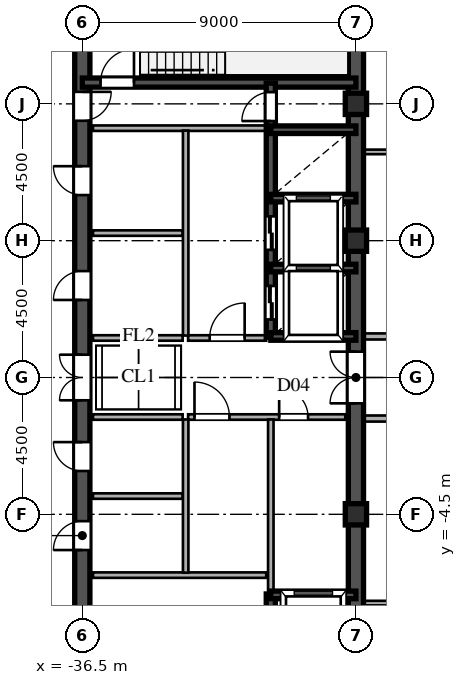
"""IFC4 building model, lengths in metres.
Left out: names, types, materials, properties, quantities, classifications, styles, units other than length and angle.
Written with IfcOpenShell. Run it as: python <this file> out.ifc"""

import sys

from ifc_helpers import new_model, si_unit, direction, frame, frame_2d, origin, origin_2d, place, context, subcontext, project, spatial, rectangle, hollow_rectangle, extrude, source, transform, mapped, element, fill, save


model = new_model("IFC4")
c1 = context("Model", 3, precision=1e-05, world=origin(), true_north=direction((0.0, 1.0)))
c2 = subcontext(c1, "Body", "Model", "MODEL_VIEW")
j1 = project(units=[si_unit("LENGTHUNIT", "METRE"), si_unit("PLANEANGLEUNIT", "RADIAN")], contexts=[c1])
p1 = place(None, origin())
s1 = spatial("IfcSite", under=j1, at=p1, CompositionType="ELEMENT")
p2 = place(p1, origin())
s2 = spatial("IfcBuilding", under=s1, at=p2, CompositionType="ELEMENT")
p3 = place(p2, frame((0.0, 0.0, 254.4)))
s3 = spatial("IfcBuildingStorey", under=s2, at=p3, CompositionType="ELEMENT", Elevation=254.4)
m1 = source(origin(), c2, "Body", "SweptSolid", [
    extrude(hollow_rectangle(XDim=0.7, YDim=0.7, WallThickness=0.03, at=origin_2d()), origin(), (0.0, 0.0, 1.0), 3.75),
])
for number, where, z_axis, x_axis in (
    (1, (-27.5, -4.5, 0.0), (0.0, 0.0, 1.0), (1.0, 0.0, 0.0)),
    (2, (-27.5, 4.5, 0.0), (0.0, 0.0, 1.0), (1.0, 0.0, 0.0)),
    (3, (-27.5, 9.0, 0.0), (0.0, 0.0, 1.0), (1.0, 0.0, 0.0)),
):
    element("IfcColumn", number, at=place(p3, frame(where, z_axis=z_axis, x_axis=x_axis)), inside=s3, PredefinedType="COLUMN", context=c2, shape_type="MappedRepresentation", body=[
        mapped(m1, transform((0.0, 0.0, 0.0), scale=1.0)),
    ])
for number, where, z_axis, x_axis in (
    (4, (-27.5, -13.5, 0.0), (0.0, 0.0, 1.0), (0.0, 1.0, 0.0)),
    (5, (-27.5, 1.3, 0.0), (0.0, 0.0, 1.0), (0.0, 1.0, 0.0)),
):
    element("IfcWall", number, at=place(p3, frame(where, z_axis=z_axis, x_axis=x_axis)), inside=s3, PredefinedType="SHEAR", context=c2, shape_type="SweptSolid", body=[
        extrude(rectangle(XDim=12.2, YDim=0.5, at=frame_2d((6.1, 0.0))), origin(), (0.0, 0.0, 1.0), 3.53),
    ])
p4 = place(p3, frame((-27.5, -1.3, 0.0), z_axis=(0.0, 0.0, 1.0), x_axis=(0.0, 1.0, 0.0)))
e6 = element("IfcWall", 6, at=p4, inside=s3, PredefinedType="SHEAR", context=c2, shape_type="SweptSolid", body=[
    extrude(rectangle(XDim=2.6, YDim=0.5, at=frame_2d((1.3, 0.0))), origin(), (0.0, 0.0, 1.0), 3.53),
])
p5 = place(p4, frame((0.45, 0.0, 0.0)))
e7 = element("IfcOpeningElement", 7, at=p5, cuts=e6, PredefinedType="OPENING", context=c2, shape_type="SweptSolid", body=[
    extrude(rectangle(XDim=1.7, YDim=2.35, at=frame_2d((0.85, 1.175))), frame((0.0, 0.26, 0.0), z_axis=(0.0, -1.0, 0.0), x_axis=(1.0, 0.0, 0.0)), (0.0, 0.0, 1.0), 0.52),
])
p6 = place(p3, frame((-36.5, -13.65, 0.0), z_axis=(0.0, 0.0, 1.0), x_axis=(0.0, 1.0, 0.0)))
e8 = element("IfcWall", 8, at=p6, inside=s3, PredefinedType="SHEAR", context=c2, shape_type="SweptSolid", body=[
    extrude(rectangle(XDim=7.15, YDim=0.5, at=frame_2d((3.575, 0.0))), origin(), (0.0, 0.0, 1.0), 3.53),
])
p7 = place(p6, frame((4.675, 0.0, 0.0)))
e9 = element("IfcOpeningElement", 9, at=p7, cuts=e8, PredefinedType="OPENING", context=c2, shape_type="SweptSolid", body=[
    extrude(rectangle(XDim=1.15, YDim=2.2, at=frame_2d((0.575, 1.1))), frame((0.0, 0.26, 0.0), z_axis=(0.0, -1.0, 0.0), x_axis=(1.0, 0.0, 0.0)), (0.0, 0.0, 1.0), 0.52),
])
p8 = place(p3, frame((-36.5, -1.3, 0.0), z_axis=(0.0, 0.0, 1.0), x_axis=(0.0, 1.0, 0.0)))
e10 = element("IfcWall", 10, at=p8, inside=s3, PredefinedType="SHEAR", context=c2, shape_type="SweptSolid", body=[
    extrude(rectangle(XDim=2.6, YDim=0.5, at=frame_2d((1.3, 0.0))), origin(), (0.0, 0.0, 1.0), 3.53),
])
p9 = place(p8, frame((0.55, 0.0, 0.0)))
e11 = element("IfcOpeningElement", 11, at=p9, cuts=e10, PredefinedType="OPENING", context=c2, shape_type="SweptSolid", body=[
    extrude(rectangle(XDim=1.5, YDim=2.3, at=frame_2d((0.75, 1.15))), frame((0.0, 0.26, 0.0), z_axis=(0.0, -1.0, 0.0), x_axis=(1.0, 0.0, 0.0)), (0.0, 0.0, 1.0), 0.52),
])
p10 = place(p3, frame((-36.5, 8.2, 0.0), z_axis=(0.0, 0.0, 1.0), x_axis=(0.0, 1.0, 0.0)))
e12 = element("IfcWall", 12, at=p10, inside=s3, PredefinedType="SHEAR", context=c2, shape_type="SweptSolid", body=[
    extrude(rectangle(XDim=5.45, YDim=0.5, at=frame_2d((2.725, 0.0))), origin(), (0.0, 0.0, 1.0), 3.53),
])
p11 = place(p10, frame((0.245, 0.0, 0.0)))
e13 = element("IfcOpeningElement", 13, at=p11, cuts=e12, PredefinedType="OPENING", context=c2, shape_type="SweptSolid", body=[
    extrude(rectangle(XDim=0.95, YDim=2.15, at=frame_2d((0.475, 1.075))), frame((0.0, 0.26, 0.0), z_axis=(0.0, -1.0, 0.0), x_axis=(1.0, 0.0, 0.0)), (0.0, 0.0, 1.0), 0.52),
])
p12 = place(p3, frame((-36.5, -6.5, 0.0), z_axis=(0.0, 0.0, 1.0), x_axis=(0.0, 1.0, 0.0)))
e14 = element("IfcWall", 14, at=p12, inside=s3, PredefinedType="SHEAR", context=c2, shape_type="SweptSolid", body=[
    extrude(rectangle(XDim=2.6, YDim=0.5, at=frame_2d((1.3, 0.0))), origin(), (0.0, 0.0, 1.0), 3.53),
])
p13 = place(p12, frame((0.825, 0.0, 0.0)))
e15 = element("IfcOpeningElement", 15, at=p13, cuts=e14, PredefinedType="OPENING", context=c2, shape_type="SweptSolid", body=[
    extrude(rectangle(XDim=0.95, YDim=2.15, at=frame_2d((0.475, 1.075))), frame((0.0, 0.26, 0.0), z_axis=(0.0, -1.0, 0.0), x_axis=(1.0, 0.0, 0.0)), (0.0, 0.0, 1.0), 0.52),
])
p14 = place(p3, frame((-36.5, -3.9, 0.0), z_axis=(0.0, 0.0, 1.0), x_axis=(0.0, 1.0, 0.0)))
e16 = element("IfcWall", 16, at=p14, inside=s3, PredefinedType="SHEAR", context=c2, shape_type="SweptSolid", body=[
    extrude(rectangle(XDim=2.6, YDim=0.5, at=frame_2d((1.3, 0.0))), origin(), (0.0, 0.0, 1.0), 3.53),
])
p15 = place(p14, frame((0.825, 0.0, 0.0)))
e17 = element("IfcOpeningElement", 17, at=p15, cuts=e16, PredefinedType="OPENING", context=c2, shape_type="SweptSolid", body=[
    extrude(rectangle(XDim=0.95, YDim=2.15, at=frame_2d((0.475, 1.075))), frame((0.0, 0.26, 0.0), z_axis=(0.0, -1.0, 0.0), x_axis=(1.0, 0.0, 0.0)), (0.0, 0.0, 1.0), 0.52),
])
p16 = place(p3, frame((-36.5, 1.3, 0.0), z_axis=(0.0, 0.0, 1.0), x_axis=(0.0, 1.0, 0.0)))
e18 = element("IfcWall", 18, at=p16, inside=s3, PredefinedType="SHEAR", context=c2, shape_type="SweptSolid", body=[
    extrude(rectangle(XDim=3.45, YDim=0.5, at=frame_2d((1.725, 0.0))), origin(), (0.0, 0.0, 1.0), 3.53),
])
p17 = place(p16, frame((1.25, 0.0, 0.0)))
e19 = element("IfcOpeningElement", 19, at=p17, cuts=e18, PredefinedType="OPENING", context=c2, shape_type="SweptSolid", body=[
    extrude(rectangle(XDim=0.95, YDim=2.15, at=frame_2d((0.475, 1.075))), frame((0.0, 0.26, 0.0), z_axis=(0.0, -1.0, 0.0), x_axis=(1.0, 0.0, 0.0)), (0.0, 0.0, 1.0), 0.52),
])
p18 = place(p3, frame((-36.5, 4.75, 0.0), z_axis=(0.0, 0.0, 1.0), x_axis=(0.0, 1.0, 0.0)))
e20 = element("IfcWall", 20, at=p18, inside=s3, PredefinedType="SHEAR", context=c2, shape_type="SweptSolid", body=[
    extrude(rectangle(XDim=3.45, YDim=0.5, at=frame_2d((1.725, 0.0))), origin(), (0.0, 0.0, 1.0), 3.53),
])
p19 = place(p18, frame((1.25, 0.0, 0.0)))
e21 = element("IfcOpeningElement", 21, at=p19, cuts=e20, PredefinedType="OPENING", context=c2, shape_type="SweptSolid", body=[
    extrude(rectangle(XDim=0.95, YDim=2.15, at=frame_2d((0.475, 1.075))), frame((0.0, 0.26, 0.0), z_axis=(0.0, -1.0, 0.0), x_axis=(1.0, 0.0, 0.0)), (0.0, 0.0, 1.0), 0.52),
])
p20 = place(p3, frame((-36.5, 9.7, 0.0), z_axis=(0.0, 0.0, 1.0), x_axis=(1.0, 0.0, 0.0)))
e22 = element("IfcWall", 22, at=p20, inside=s3, PredefinedType="SHEAR", context=c2, shape_type="SweptSolid", body=[
    extrude(rectangle(XDim=9.0, YDim=0.3, at=frame_2d((4.5, 0.0))), origin(), (0.0, 0.0, 1.0), 3.53),
])
p21 = place(p20, frame((0.6, 0.0, 0.0)))
e23 = element("IfcOpeningElement", 23, at=p21, cuts=e22, PredefinedType="OPENING", context=c2, shape_type="SweptSolid", body=[
    extrude(rectangle(XDim=1.1, YDim=2.2, at=frame_2d((0.55, 1.1))), frame((0.0, 0.16, 0.0), z_axis=(0.0, -1.0, 0.0), x_axis=(1.0, 0.0, 0.0)), (0.0, 0.0, 1.0), 0.32),
])
for number, where, z_axis, x_axis in (
    (24, (-30.3, -7.15, 0.0), (0.0, 0.0, 1.0), (1.0, 0.0, 0.0)),
    (25, (-30.3, 1.35, 0.0), (0.0, 0.0, 1.0), (1.0, 0.0, 0.0)),
    (26, (-30.3, 3.6, 0.0), (0.0, 0.0, 1.0), (1.0, 0.0, 0.0)),
    (27, (-30.3, 5.9, 0.0), (0.0, 0.0, 1.0), (1.0, 0.0, 0.0)),
    (28, (-30.3, 8.15, 0.0), (0.0, 0.0, 1.0), (1.0, 0.0, 0.0)),
):
    element("IfcWall", number, at=place(p3, frame(where, z_axis=z_axis, x_axis=x_axis)), inside=s3, PredefinedType="SHEAR", context=c2, shape_type="SweptSolid", body=[
        extrude(rectangle(XDim=2.8, YDim=0.25, at=frame_2d((1.4, 0.0))), origin(), (0.0, 0.0, 1.0), 3.53),
    ])
p22 = place(p3, frame((-30.3, -9.68, 0.0), z_axis=(0.0, 0.0, 1.0), x_axis=(0.0, 1.0, 0.0)))
e29 = element("IfcWall", 29, at=p22, inside=s3, PredefinedType="SHEAR", context=c2, shape_type="SweptSolid", body=[
    extrude(rectangle(XDim=2.56, YDim=0.3, at=frame_2d((1.28, 0.0))), origin(), (0.0, 0.0, 1.0), 3.53),
])
p23 = place(p22, frame((0.68, 0.0, 0.0)))
e30 = element("IfcOpeningElement", 30, at=p23, cuts=e29, PredefinedType="OPENING", context=c2, shape_type="SweptSolid", body=[
    extrude(rectangle(XDim=1.2, YDim=2.25, at=frame_2d((0.6, 1.125))), frame((0.0, 0.16, 0.0), z_axis=(0.0, -1.0, 0.0), x_axis=(1.0, 0.0, 0.0)), (0.0, 0.0, 1.0), 0.32),
])
p24 = place(p3, frame((-30.3, 1.32, 0.0), z_axis=(0.0, 0.0, 1.0), x_axis=(0.0, 1.0, 0.0)))
e31 = element("IfcWall", 31, at=p24, inside=s3, PredefinedType="SHEAR", context=c2, shape_type="SweptSolid", body=[
    extrude(rectangle(XDim=2.28, YDim=0.3, at=frame_2d((1.14, 0.0))), origin(), (0.0, 0.0, 1.0), 3.53),
])
p25 = place(p24, frame((0.59, 0.0, 0.0)))
e32 = element("IfcOpeningElement", 32, at=p25, cuts=e31, PredefinedType="OPENING", context=c2, shape_type="SweptSolid", body=[
    extrude(rectangle(XDim=1.1, YDim=2.2, at=frame_2d((0.55, 1.1))), frame((0.0, 0.16, 0.0), z_axis=(0.0, -1.0, 0.0), x_axis=(1.0, 0.0, 0.0)), (0.0, 0.0, 1.0), 0.32),
])
p26 = place(p3, frame((-30.3, 3.6, 0.0), z_axis=(0.0, 0.0, 1.0), x_axis=(0.0, 1.0, 0.0)))
e33 = element("IfcWall", 33, at=p26, inside=s3, PredefinedType="SHEAR", context=c2, shape_type="SweptSolid", body=[
    extrude(rectangle(XDim=2.3, YDim=0.3, at=frame_2d((1.15, 0.0))), origin(), (0.0, 0.0, 1.0), 3.53),
])
p27 = place(p26, frame((0.6, 0.0, 0.0)))
e34 = element("IfcOpeningElement", 34, at=p27, cuts=e33, PredefinedType="OPENING", context=c2, shape_type="SweptSolid", body=[
    extrude(rectangle(XDim=1.1, YDim=2.2, at=frame_2d((0.55, 1.1))), frame((0.0, 0.16, 0.0), z_axis=(0.0, -1.0, 0.0), x_axis=(1.0, 0.0, 0.0)), (0.0, 0.0, 1.0), 0.32),
])
p28 = place(p3, frame((-30.3, 5.9, 0.0), z_axis=(0.0, 0.0, 1.0), x_axis=(0.0, 1.0, 0.0)))
e35 = element("IfcWall", 35, at=p28, inside=s3, PredefinedType="SHEAR", context=c2, shape_type="SweptSolid", body=[
    extrude(rectangle(XDim=2.25, YDim=0.3, at=frame_2d((1.125, 0.0))), origin(), (0.0, 0.0, 1.0), 3.53),
])
p29 = place(p3, frame((-30.3, 8.15, 0.0), z_axis=(0.0, 0.0, 1.0), x_axis=(0.0, 1.0, 0.0)))
e36 = element("IfcWall", 36, at=p29, inside=s3, PredefinedType="SHEAR", context=c2, shape_type="SweptSolid", body=[
    extrude(rectangle(XDim=1.53, YDim=0.3, at=frame_2d((0.765, 0.0))), origin(), (0.0, 0.0, 1.0), 3.53),
])
p30 = place(p29, frame((0.285, 0.0, 0.0)))
e37 = element("IfcOpeningElement", 37, at=p30, cuts=e36, PredefinedType="OPENING", context=c2, shape_type="SweptSolid", body=[
    extrude(rectangle(XDim=0.95, YDim=2.15, at=frame_2d((0.475, 1.075))), frame((0.0, 0.16, 0.0), z_axis=(0.0, -1.0, 0.0), x_axis=(1.0, 0.0, 0.0)), (0.0, 0.0, 1.0), 0.32),
])
for number, where, z_axis, x_axis in (
    (38, (-36.15, -6.5, 0.0), (0.0, 0.0, 1.0), (1.0, 0.0, 0.0)),
    (39, (-36.15, 8.2, 0.0), (0.0, 0.0, 1.0), (1.0, 0.0, 0.0)),
):
    element("IfcWall", number, at=place(p3, frame(where, z_axis=z_axis, x_axis=x_axis)), inside=s3, PredefinedType="PARTITIONING", context=c2, shape_type="SweptSolid", body=[
        extrude(rectangle(XDim=5.7, YDim=0.18, at=frame_2d((2.85, 0.0))), origin(), (0.0, 0.0, 1.0), 3.53),
    ])
p31 = place(p3, frame((-33.1, -6.42, 0.0), z_axis=(0.0, 0.0, 1.0), x_axis=(0.0, 1.0, 0.0)))
e40 = element("IfcWall", 40, at=p31, inside=s3, PredefinedType="PARTITIONING", context=c2, shape_type="SweptSolid", body=[
    extrude(rectangle(XDim=5.04, YDim=0.18, at=frame_2d((2.52, 0.0))), origin(), (0.0, 0.0, 1.0), 3.53),
])
p32 = place(p3, frame((-33.1, 1.38, 0.0), z_axis=(0.0, 0.0, 1.0), x_axis=(0.0, 1.0, 0.0)))
e41 = element("IfcWall", 41, at=p32, inside=s3, PredefinedType="PARTITIONING", context=c2, shape_type="SweptSolid", body=[
    extrude(rectangle(XDim=6.74, YDim=0.18, at=frame_2d((3.37, 0.0))), origin(), (0.0, 0.0, 1.0), 3.53),
])
p33 = place(p3, frame((-30.3, -1.3, 0.0), z_axis=(0.0, 0.0, 1.0), x_axis=(1.0, 0.0, 0.0)))
e42 = element("IfcWall", 42, at=p33, inside=s3, PredefinedType="PARTITIONING", context=c2, shape_type="SweptSolid", body=[
    extrude(rectangle(XDim=2.45, YDim=0.18, at=frame_2d((1.225, 0.0))), origin(), (0.0, 0.0, 1.0), 3.53),
])
p34 = place(p33, frame((0.275, 0.0, 0.0)))
e43 = element("IfcOpeningElement", 43, at=p34, cuts=e42, PredefinedType="OPENING", context=c2, shape_type="SweptSolid", body=[
    extrude(rectangle(XDim=0.95, YDim=2.15, at=frame_2d((0.475, 1.075))), frame((0.0, 0.1, 0.0), z_axis=(0.0, -1.0, 0.0), x_axis=(1.0, 0.0, 0.0)), (0.0, 0.0, 1.0), 0.2),
])
p35 = place(p3, frame((-33.02, -1.3, 0.0), z_axis=(0.0, 0.0, 1.0), x_axis=(1.0, 0.0, 0.0)))
e44 = element("IfcWall", 44, at=p35, inside=s3, PredefinedType="PARTITIONING", context=c2, shape_type="SweptSolid", body=[
    extrude(rectangle(XDim=2.72, YDim=0.18, at=frame_2d((1.36, 0.0))), origin(), (0.0, 0.0, 1.0), 3.53),
])
p36 = place(p35, frame((0.21, 0.0, 0.0)))
e45 = element("IfcOpeningElement", 45, at=p36, cuts=e44, PredefinedType="OPENING", context=c2, shape_type="SweptSolid", body=[
    extrude(rectangle(XDim=1.15, YDim=2.2, at=frame_2d((0.575, 1.1))), frame((0.0, 0.1, 0.0), z_axis=(0.0, -1.0, 0.0), x_axis=(1.0, 0.0, 0.0)), (0.0, 0.0, 1.0), 0.2),
])
p37 = place(p3, frame((-30.3, -7.12, 0.0), z_axis=(0.0, 0.0, 1.0), x_axis=(0.0, 1.0, 0.0)))
e46 = element("IfcWall", 46, at=p37, inside=s3, PredefinedType="PARTITIONING", context=c2, shape_type="SweptSolid", body=[
    extrude(rectangle(XDim=5.74, YDim=0.18, at=frame_2d((2.87, 0.0))), origin(), (0.0, 0.0, 1.0), 3.53),
])
p38 = place(p3, frame((-33.02, 1.3, 0.0), z_axis=(0.0, 0.0, 1.0), x_axis=(1.0, 0.0, 0.0)))
e47 = element("IfcWall", 47, at=p38, inside=s3, PredefinedType="PARTITIONING", context=c2, shape_type="SweptSolid", body=[
    extrude(rectangle(XDim=2.57, YDim=0.18, at=frame_2d((1.285, 0.0))), origin(), (0.0, 0.0, 1.0), 3.53),
])
p39 = place(p38, frame((0.71, 0.0, 0.0)))
e48 = element("IfcOpeningElement", 48, at=p39, cuts=e47, PredefinedType="OPENING", context=c2, shape_type="SweptSolid", body=[
    extrude(rectangle(XDim=1.15, YDim=2.2, at=frame_2d((0.575, 1.1))), frame((0.0, 0.1, 0.0), z_axis=(0.0, -1.0, 0.0), x_axis=(1.0, 0.0, 0.0)), (0.0, 0.0, 1.0), 0.2),
])
for number, where, z_axis, x_axis in (
    (49, (-36.15, -1.3, 0.0), (0.0, 0.0, 1.0), (1.0, 0.0, 0.0)),
    (50, (-36.15, 1.3, 0.0), (0.0, 0.0, 1.0), (1.0, 0.0, 0.0)),
    (51, (-36.15, -3.9, 0.0), (0.0, 0.0, 1.0), (1.0, 0.0, 0.0)),
    (52, (-36.15, 4.75, 0.0), (0.0, 0.0, 1.0), (1.0, 0.0, 0.0)),
):
    element("IfcWall", number, at=place(p3, frame(where, z_axis=z_axis, x_axis=x_axis)), inside=s3, PredefinedType="PARTITIONING", context=c2, shape_type="SweptSolid", body=[
        extrude(rectangle(XDim=2.95, YDim=0.18, at=frame_2d((1.475, 0.0))), origin(), (0.0, 0.0, 1.0), 3.53),
    ])
p40 = place(p3, frame((-27.245, -7.42, 0.0), z_axis=(0.0, 0.0, 1.0), x_axis=(1.0, 0.0, 0.0)))
e53 = element("IfcWall", 53, at=p40, inside=s3, PredefinedType="PARTITIONING", context=c2, shape_type="SweptSolid", body=[
    extrude(rectangle(XDim=7.66, YDim=0.15, at=frame_2d((3.83, 0.0))), origin(), (0.0, 0.0, 1.0), 3.53),
])
p41 = place(p40, frame((3.57, 0.0, 0.0)))
e54 = element("IfcOpeningElement", 54, at=p41, cuts=e53, PredefinedType="OPENING", context=c2, shape_type="SweptSolid", body=[
    extrude(rectangle(XDim=0.95, YDim=2.15, at=frame_2d((0.475, 1.075))), frame((0.0, 0.085, 0.0), z_axis=(0.0, -1.0, 0.0), x_axis=(1.0, 0.0, 0.0)), (0.0, 0.0, 1.0), 0.17),
])
p42 = place(p3, frame((-27.245, -1.35, 0.0), z_axis=(0.0, 0.0, 1.0), x_axis=(1.0, 0.0, 0.0)))
e55 = element("IfcWall", 55, at=p42, inside=s3, PredefinedType="PARTITIONING", context=c2, shape_type="SweptSolid", body=[
    extrude(rectangle(XDim=54.49, YDim=0.2, at=frame_2d((27.245, 0.0))), origin(), (0.0, 0.0, 1.0), 3.53),
])
p43 = place(p42, frame((24.97, 0.0, 0.0)))
e56 = element("IfcOpeningElement", 56, at=p43, cuts=e55, PredefinedType="OPENING", context=c2, shape_type="SweptSolid", body=[
    extrude(rectangle(XDim=1.05, YDim=2.25, at=frame_2d((0.525, 1.125))), frame((0.0, 0.11, 0.0), z_axis=(0.0, -1.0, 0.0), x_axis=(1.0, 0.0, 0.0)), (0.0, 0.0, 1.0), 0.22),
])
p44 = place(p3, frame((-27.245, 1.35, 0.0), z_axis=(0.0, 0.0, 1.0), x_axis=(1.0, 0.0, 0.0)))
e57 = element("IfcWall", 57, at=p44, inside=s3, PredefinedType="PARTITIONING", context=c2, shape_type="SweptSolid", body=[
    extrude(rectangle(XDim=54.49, YDim=0.2, at=frame_2d((27.245, 0.0))), origin(), (0.0, 0.0, 1.0), 3.53),
])
p45 = place(p44, frame((24.97, 0.0, 0.0)))
e58 = element("IfcOpeningElement", 58, at=p45, cuts=e57, PredefinedType="OPENING", context=c2, shape_type="SweptSolid", body=[
    extrude(rectangle(XDim=1.05, YDim=2.25, at=frame_2d((0.525, 1.125))), frame((0.0, 0.11, 0.0), z_axis=(0.0, -1.0, 0.0), x_axis=(1.0, 0.0, 0.0)), (0.0, 0.0, 1.0), 0.22),
])
p46 = place(p3, frame((-27.245, 7.42, 0.0), z_axis=(0.0, 0.0, 1.0), x_axis=(1.0, 0.0, 0.0)))
e59 = element("IfcWall", 59, at=p46, inside=s3, PredefinedType="PARTITIONING", context=c2, shape_type="SweptSolid", body=[
    extrude(rectangle(XDim=7.66, YDim=0.15, at=frame_2d((3.83, 0.0))), origin(), (0.0, 0.0, 1.0), 3.53),
])
p47 = place(p46, frame((3.57, 0.0, 0.0)))
e60 = element("IfcOpeningElement", 60, at=p47, cuts=e59, PredefinedType="OPENING", context=c2, shape_type="SweptSolid", body=[
    extrude(rectangle(XDim=0.95, YDim=2.15, at=frame_2d((0.475, 1.075))), frame((0.0, 0.085, 0.0), z_axis=(0.0, -1.0, 0.0), x_axis=(1.0, 0.0, 0.0)), (0.0, 0.0, 1.0), 0.17),
])
m2 = source(origin(), c2, "Body", "SweptSolid", [
    extrude(rectangle(XDim=1.7, YDim=2.35, at=frame_2d((0.85, 1.175))), frame((0.0, 0.025, 0.0), z_axis=(0.0, -1.0, 0.0), x_axis=(1.0, 0.0, 0.0)), (0.0, 0.0, 1.0), 0.05),
])
p48 = place(p5, origin())
e61 = element("IfcDoor", 61, at=p48, inside=s3, OperationType="DOUBLE_SWING_LEFT", PredefinedType="DOOR", context=c2, shape_type="MappedRepresentation", body=[
    mapped(m2, transform((0.0, 0.0, 0.0), scale=1.0)),
])
fill(e7, e61)
m3 = source(origin(), c2, "Body", "SweptSolid", [
    extrude(rectangle(XDim=1.5, YDim=2.3, at=frame_2d((0.75, 1.15))), frame((0.0, 0.025, 0.0), z_axis=(0.0, -1.0, 0.0), x_axis=(1.0, 0.0, 0.0)), (0.0, 0.0, 1.0), 0.05),
])
p49 = place(p9, origin())
e62 = element("IfcDoor", 62, at=p49, inside=s3, OperationType="DOUBLE_SWING_LEFT", PredefinedType="DOOR", context=c2, shape_type="MappedRepresentation", body=[
    mapped(m3, transform((0.0, 0.0, 0.0), scale=1.0)),
])
fill(e11, e62)
m4 = source(origin(), c2, "Body", "SweptSolid", [
    extrude(rectangle(XDim=0.95, YDim=2.15, at=frame_2d((0.475, 1.075))), frame((0.0, 0.025, 0.0), z_axis=(0.0, -1.0, 0.0), x_axis=(1.0, 0.0, 0.0)), (0.0, 0.0, 1.0), 0.05),
])
p50 = place(p11, frame((0.95, 0.0, 0.0), z_axis=(0.0, 0.0, 1.0), x_axis=(-1.0, 0.0, 0.0)))
e63 = element("IfcDoor", 63, at=p50, inside=s3, OperationType="SINGLE_SWING_RIGHT", PredefinedType="DOOR", context=c2, shape_type="MappedRepresentation", body=[
    mapped(m4, transform((0.0, 0.0, 0.0), scale=1.0)),
])
fill(e13, e63)
p51 = place(p13, origin())
e64 = element("IfcDoor", 64, at=p51, inside=s3, OperationType="SINGLE_SWING_LEFT", PredefinedType="DOOR", context=c2, shape_type="MappedRepresentation", body=[
    mapped(m4, transform((0.0, 0.0, 0.0), scale=1.0)),
])
fill(e15, e64)
p52 = place(p15, origin())
e65 = element("IfcDoor", 65, at=p52, inside=s3, OperationType="SINGLE_SWING_RIGHT", PredefinedType="DOOR", context=c2, shape_type="MappedRepresentation", body=[
    mapped(m4, transform((0.0, 0.0, 0.0), scale=1.0)),
])
fill(e17, e65)
p53 = place(p17, origin())
e66 = element("IfcDoor", 66, at=p53, inside=s3, OperationType="SINGLE_SWING_LEFT", PredefinedType="DOOR", context=c2, shape_type="MappedRepresentation", body=[
    mapped(m4, transform((0.0, 0.0, 0.0), scale=1.0)),
])
fill(e19, e66)
p54 = place(p19, origin())
e67 = element("IfcDoor", 67, at=p54, inside=s3, OperationType="SINGLE_SWING_RIGHT", PredefinedType="DOOR", context=c2, shape_type="MappedRepresentation", body=[
    mapped(m4, transform((0.0, 0.0, 0.0), scale=1.0)),
])
fill(e21, e67)
m5 = source(origin(), c2, "Body", "SweptSolid", [
    extrude(rectangle(XDim=1.1, YDim=2.2, at=frame_2d((0.55, 1.1))), frame((0.0, 0.025, 0.0), z_axis=(0.0, -1.0, 0.0), x_axis=(1.0, 0.0, 0.0)), (0.0, 0.0, 1.0), 0.05),
])
p55 = place(p21, origin())
e68 = element("IfcDoor", 68, at=p55, inside=s3, OperationType="SINGLE_SWING_RIGHT", PredefinedType="DOOR", context=c2, shape_type="MappedRepresentation", body=[
    mapped(m5, transform((0.0, 0.0, 0.0), scale=1.0)),
])
fill(e23, e68)
m6 = source(origin(), c2, "Body", "SweptSolid", [
    extrude(rectangle(XDim=1.1, YDim=2.2, at=frame_2d((0.55, 1.1))), frame((0.0, 0.025, 0.0), z_axis=(0.0, -1.0, 0.0), x_axis=(1.0, 0.0, 0.0)), (0.0, 0.0, 1.0), 0.05),
])
p56 = place(p25, origin())
e69 = element("IfcDoor", 69, at=p56, inside=s3, OperationType="DOUBLE_DOOR_SLIDING", PredefinedType="DOOR", context=c2, shape_type="MappedRepresentation", body=[
    mapped(m6, transform((0.0, 0.0, 0.0), scale=1.0)),
])
fill(e32, e69)
p57 = place(p27, origin())
e70 = element("IfcDoor", 70, at=p57, inside=s3, OperationType="DOUBLE_DOOR_SLIDING", PredefinedType="DOOR", context=c2, shape_type="MappedRepresentation", body=[
    mapped(m6, transform((0.0, 0.0, 0.0), scale=1.0)),
])
fill(e34, e70)
p58 = place(p30, origin())
e71 = element("IfcDoor", 71, at=p58, inside=s3, OperationType="SINGLE_SWING_LEFT", PredefinedType="DOOR", context=c2, shape_type="MappedRepresentation", body=[
    mapped(m4, transform((0.0, 0.0, 0.0), scale=1.0)),
])
fill(e37, e71)
p59 = place(p34, origin())
e72 = element("IfcDoor", 72, at=p59, inside=s3, OperationType="SINGLE_SWING_LEFT", PredefinedType="DOOR", context=c2, shape_type="MappedRepresentation", body=[
    mapped(m4, transform((0.0, 0.0, 0.0), scale=1.0)),
])
fill(e43, e72)
m7 = source(origin(), c2, "Body", "SweptSolid", [
    extrude(rectangle(XDim=1.15, YDim=2.2, at=frame_2d((0.575, 1.1))), frame((0.0, 0.025, 0.0), z_axis=(0.0, -1.0, 0.0), x_axis=(1.0, 0.0, 0.0)), (0.0, 0.0, 1.0), 0.05),
])
p60 = place(p36, origin())
e73 = element("IfcDoor", 73, at=p60, inside=s3, OperationType="SINGLE_SWING_LEFT", PredefinedType="DOOR", context=c2, shape_type="MappedRepresentation", body=[
    mapped(m7, transform((0.0, 0.0, 0.0), scale=1.0)),
])
fill(e45, e73)
p61 = place(p39, origin())
e74 = element("IfcDoor", 74, at=p61, inside=s3, OperationType="SINGLE_SWING_RIGHT", PredefinedType="DOOR", context=c2, shape_type="MappedRepresentation", body=[
    mapped(m7, transform((0.0, 0.0, 0.0), scale=1.0)),
])
fill(e48, e74)
save(model, sys.argv[1])
